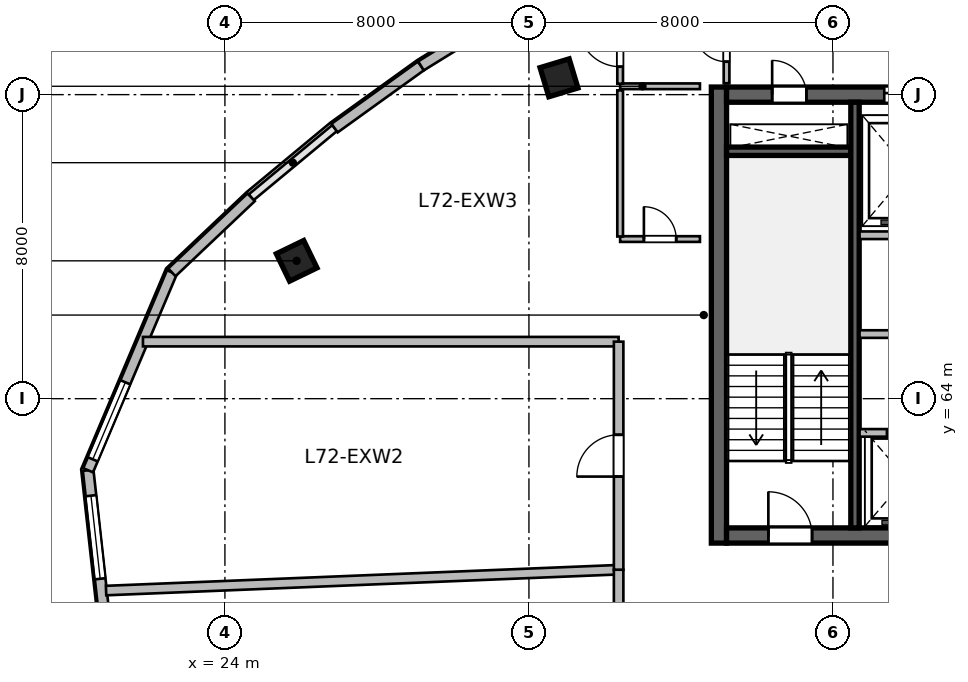
"""IFC4 building model, lengths in metres.
Left out: names, types, materials, properties, quantities, classifications, styles, units other than length and angle.
Written with IfcOpenShell. Run it as: python <this file> out.ifc"""

import sys

from ifc_helpers import new_model, si_unit, direction, frame, frame_2d, origin, origin_2d, place, context, subcontext, project, spatial, rectangle, extrude, source, transform, mapped, element, fill, save


model = new_model("IFC4")
c1 = context("Model", 3, precision=1e-05, world=origin(), true_north=direction((0.0, 1.0)))
c2 = subcontext(c1, "Body", "Model", "MODEL_VIEW")
j1 = project(units=[si_unit("LENGTHUNIT", "METRE"), si_unit("PLANEANGLEUNIT", "RADIAN")], contexts=[c1])
p1 = place(None, origin())
s1 = spatial("IfcSite", under=j1, at=p1, CompositionType="ELEMENT")
p2 = place(p1, origin())
s2 = spatial("IfcBuilding", under=s1, at=p2, CompositionType="ELEMENT")
p3 = place(p2, frame((0.0, 0.0, 295.2)))
s3 = spatial("IfcBuildingStorey", under=s2, at=p3, CompositionType="ELEMENT", Elevation=295.2)
m1 = source(origin(), c2, "Body", "SweptSolid", [
    extrude(rectangle(XDim=12.0, YDim=0.4, at=frame_2d((6.0, 0.0))), origin(), (0.0, 0.0, 1.0), 3.9),
])
p4 = place(p3, frame((37.0, 60.2, 0.0), z_axis=(0.0, 0.0, 1.0), x_axis=(0.0, 1.0, 0.0)))
e1 = element("IfcWall", 1, at=p4, inside=s3, PredefinedType="SHEAR", context=c2, shape_type="MappedRepresentation", body=[
    mapped(m1, transform((0.0, 0.0, 0.0), scale=1.0)),
])
m2 = source(origin(), c2, "Body", "SweptSolid", [
    extrude(rectangle(XDim=21.6, YDim=0.4, at=frame_2d((10.8, 0.0))), origin(), (0.0, 0.0, 1.0), 3.9),
])
p5 = place(p3, frame((37.2, 60.4, 0.0), z_axis=(0.0, 0.0, 1.0), x_axis=(1.0, 0.0, 0.0)))
e2 = element("IfcWall", 2, at=p5, inside=s3, PredefinedType="SHEAR", context=c2, shape_type="MappedRepresentation", body=[
    mapped(m2, transform((0.0, 0.0, 0.0), scale=1.0)),
])
p6 = place(p5, frame((1.1, 0.0, 0.0)))
e3 = element("IfcOpeningElement", 3, at=p6, cuts=e2, PredefinedType="OPENING", context=c2, shape_type="SweptSolid", body=[
    extrude(rectangle(XDim=1.15, YDim=2.15, at=frame_2d((0.575, 1.075))), frame((0.0, 0.21, 0.0), z_axis=(0.0, -1.0, 0.0), x_axis=(1.0, 0.0, 0.0)), (0.0, 0.0, 1.0), 0.42),
])
p7 = place(p5, frame((19.5, 0.0, 0.0)))
e4 = element("IfcOpeningElement", 4, at=p7, cuts=e2, PredefinedType="OPENING", context=c2, shape_type="SweptSolid", body=[
    extrude(rectangle(XDim=0.9, YDim=2.1, at=frame_2d((0.45, 1.05))), frame((0.0, 0.21, 0.0), z_axis=(0.0, -1.0, 0.0), x_axis=(1.0, 0.0, 0.0)), (0.0, 0.0, 1.0), 0.42),
])
p8 = place(p5, frame((12.02, 0.0, 0.0)))
e5 = element("IfcOpeningElement", 5, at=p8, cuts=e2, PredefinedType="OPENING", context=c2, shape_type="SweptSolid", body=[
    extrude(rectangle(XDim=1.6, YDim=2.15, at=frame_2d((0.8, 1.075))), frame((0.0, 0.21, 0.0), z_axis=(0.0, -1.0, 0.0), x_axis=(1.0, 0.0, 0.0)), (0.0, 0.0, 1.0), 0.42),
])
p9 = place(p3, frame((37.2, 72.0, 0.0), z_axis=(0.0, 0.0, 1.0), x_axis=(1.0, 0.0, 0.0)))
e6 = element("IfcWall", 6, at=p9, inside=s3, PredefinedType="SHEAR", context=c2, shape_type="MappedRepresentation", body=[
    mapped(m2, transform((0.0, 0.0, 0.0), scale=1.0)),
])
p10 = place(p9, frame((1.2, 0.0, 0.0)))
e7 = element("IfcOpeningElement", 7, at=p10, cuts=e6, PredefinedType="OPENING", context=c2, shape_type="SweptSolid", body=[
    extrude(rectangle(XDim=0.9, YDim=2.1, at=frame_2d((0.45, 1.05))), frame((0.0, 0.21, 0.0), z_axis=(0.0, -1.0, 0.0), x_axis=(1.0, 0.0, 0.0)), (0.0, 0.0, 1.0), 0.42),
])
p11 = place(p9, frame((14.7, 0.0, 0.0)))
e8 = element("IfcOpeningElement", 8, at=p11, cuts=e6, PredefinedType="OPENING", context=c2, shape_type="SweptSolid", body=[
    extrude(rectangle(XDim=1.2, YDim=2.15, at=frame_2d((0.6, 1.075))), frame((0.0, 0.21, 0.0), z_axis=(0.0, -1.0, 0.0), x_axis=(1.0, 0.0, 0.0)), (0.0, 0.0, 1.0), 0.42),
])
p12 = place(p9, frame((4.15, 0.0, 0.0)))
e9 = element("IfcOpeningElement", 9, at=p12, cuts=e6, PredefinedType="OPENING", context=c2, shape_type="SweptSolid", body=[
    extrude(rectangle(XDim=1.3, YDim=2.15, at=frame_2d((0.65, 1.075))), frame((0.0, 0.21, 0.0), z_axis=(0.0, -1.0, 0.0), x_axis=(1.0, 0.0, 0.0)), (0.0, 0.0, 1.0), 0.42),
])
p13 = place(p9, frame((7.25, 0.0, 0.0)))
e10 = element("IfcOpeningElement", 10, at=p13, cuts=e6, PredefinedType="OPENING", context=c2, shape_type="SweptSolid", body=[
    extrude(rectangle(XDim=0.9, YDim=2.1, at=frame_2d((0.45, 1.05))), frame((0.0, 0.21, 0.0), z_axis=(0.0, -1.0, 0.0), x_axis=(1.0, 0.0, 0.0)), (0.0, 0.0, 1.0), 0.42),
])
p14 = place(p9, frame((10.95, 0.0, 0.0)))
e11 = element("IfcOpeningElement", 11, at=p14, cuts=e6, PredefinedType="OPENING", context=c2, shape_type="SweptSolid", body=[
    extrude(rectangle(XDim=0.9, YDim=2.1, at=frame_2d((0.45, 1.05))), frame((0.0, 0.21, 0.0), z_axis=(0.0, -1.0, 0.0), x_axis=(1.0, 0.0, 0.0)), (0.0, 0.0, 1.0), 0.42),
])
m3 = source(origin(), c2, "Body", "SweptSolid", [
    extrude(rectangle(XDim=3.27, YDim=0.22, at=frame_2d((1.635, 0.0))), origin(), (0.0, 0.0, 1.0), 3.9),
])
p15 = place(p3, frame((37.2, 70.51, 0.0), z_axis=(0.0, 0.0, 1.0), x_axis=(1.0, 0.0, 0.0)))
e12 = element("IfcWall", 12, at=p15, inside=s3, PredefinedType="SHEAR", context=c2, shape_type="MappedRepresentation", body=[
    mapped(m3, transform((0.0, 0.0, 0.0), scale=1.0)),
])
m4 = source(origin(), c2, "Body", "SweptSolid", [
    extrude(rectangle(XDim=11.2, YDim=0.22, at=frame_2d((5.6, 0.0))), origin(), (0.0, 0.0, 1.0), 3.9),
])
p16 = place(p3, frame((40.58, 60.6, 0.0), z_axis=(0.0, 0.0, 1.0), x_axis=(0.0, 1.0, 0.0)))
e13 = element("IfcWall", 13, at=p16, inside=s3, PredefinedType="SHEAR", context=c2, shape_type="MappedRepresentation", body=[
    mapped(m4, transform((0.0, 0.0, 0.0), scale=1.0)),
])
m5 = source(origin(), c2, "Body", "SweptSolid", [
    extrude(rectangle(XDim=0.8, YDim=0.8, at=origin_2d()), origin(), (0.0, 0.0, 1.0), 3.9),
])
for number, where, z_axis, x_axis in (
    (14, (25.888, 67.627, 0.0), (0.0, 0.0, 1.0), (-0.436, 0.9, 0.0)),
    (15, (32.791, 72.442, 0.0), (0.0, 0.0, 1.0), (-0.289, 0.957, 0.0)),
):
    element("IfcColumn", number, at=place(p3, frame(where, z_axis=z_axis, x_axis=x_axis)), inside=s3, PredefinedType="COLUMN", context=c2, shape_type="MappedRepresentation", body=[
        mapped(m5, transform((0.0, 0.0, 0.0), scale=1.0)),
    ])
m6 = source(origin(), c2, "Body", "SweptSolid", [
    extrude(rectangle(XDim=7.09, YDim=0.28, at=frame_2d((3.545, 0.0))), origin(), (0.0, 0.0, 1.0), 3.64),
])
p17 = place(p3, frame((21.182, 55.069, 0.0), z_axis=(0.0, 0.0, 1.0), x_axis=(-0.110159396922, 0.993913933532, 0.0)))
e16 = element("IfcWall", 16, at=p17, inside=s3, PredefinedType="SOLIDWALL", context=c2, shape_type="MappedRepresentation", body=[
    mapped(m6, transform((0.0, 0.0, 0.0), scale=1.0)),
])
p18 = place(p17, frame((4.217, 0.0, 0.95)))
e17 = element("IfcOpeningElement", 17, at=p18, cuts=e16, PredefinedType="OPENING", context=c2, shape_type="SweptSolid", body=[
    extrude(rectangle(XDim=2.2, YDim=2.1, at=frame_2d((1.1, 1.05))), frame((0.0, 0.15, 0.0), z_axis=(0.0, -1.0, 0.0), x_axis=(1.0, 0.0, 0.0)), (0.0, 0.0, 1.0), 0.3),
])
m7 = source(origin(), c2, "Body", "SweptSolid", [
    extrude(rectangle(XDim=5.655, YDim=0.28, at=frame_2d((2.828, 0.0))), origin(), (0.0, 0.0, 1.0), 3.64),
])
p19 = place(p3, frame((20.401, 62.116, 0.0), z_axis=(0.0, 0.0, 1.0), x_axis=(0.389585063528, 0.920990487614, 0.0)))
e18 = element("IfcWall", 18, at=p19, inside=s3, PredefinedType="SOLIDWALL", context=c2, shape_type="MappedRepresentation", body=[
    mapped(m7, transform((0.0, 0.0, 0.0), scale=1.0)),
])
p20 = place(p19, frame((0.314, 0.0, 0.95)))
e19 = element("IfcOpeningElement", 19, at=p20, cuts=e18, PredefinedType="OPENING", context=c2, shape_type="SweptSolid", body=[
    extrude(rectangle(XDim=2.2, YDim=2.1, at=frame_2d((1.1, 1.05))), frame((0.0, 0.15, 0.0), z_axis=(0.0, -1.0, 0.0), x_axis=(1.0, 0.0, 0.0)), (0.0, 0.0, 1.0), 0.3),
])
m8 = source(origin(), c2, "Body", "SweptSolid", [
    extrude(rectangle(XDim=2.873, YDim=0.28, at=frame_2d((1.436, 0.0))), origin(), (0.0, 0.0, 1.0), 3.64),
])
p21 = place(p3, frame((22.604, 67.324, 0.0), z_axis=(0.0, 0.0, 1.0), x_axis=(0.72609560544, 0.687593754888, 0.0)))
e20 = element("IfcWall", 20, at=p21, inside=s3, PredefinedType="SOLIDWALL", context=c2, shape_type="MappedRepresentation", body=[
    mapped(m8, transform((0.0, 0.0, 0.0), scale=1.0)),
])
m9 = source(origin(), c2, "Body", "SweptSolid", [
    extrude(rectangle(XDim=2.802, YDim=0.28, at=frame_2d((1.401, 0.0))), origin(), (0.0, 0.0, 1.0), 3.64),
])
p22 = place(p3, frame((26.885, 71.12, 0.0), z_axis=(0.0, 0.0, 1.0), x_axis=(0.811507896482, 0.584341453217, 0.0)))
e21 = element("IfcWall", 21, at=p22, inside=s3, PredefinedType="SOLIDWALL", context=c2, shape_type="MappedRepresentation", body=[
    mapped(m9, transform((0.0, 0.0, 0.0), scale=1.0)),
])
m10 = source(origin(), c2, "Body", "SweptSolid", [
    extrude(rectangle(XDim=2.755, YDim=0.28, at=frame_2d((1.377, 0.0))), origin(), (0.0, 0.0, 1.0), 3.64),
])
p23 = place(p3, frame((29.159, 72.757, 0.0), z_axis=(0.0, 0.0, 1.0), x_axis=(0.850750210743, 0.525570241661, 0.0)))
e22 = element("IfcWall", 22, at=p23, inside=s3, PredefinedType="SOLIDWALL", context=c2, shape_type="MappedRepresentation", body=[
    mapped(m10, transform((0.0, 0.0, 0.0), scale=1.0)),
])
m11 = source(origin(), c2, "Body", "SweptSolid", [
    extrude(rectangle(XDim=8.8, YDim=0.2, at=frame_2d((4.4, 0.0))), origin(), (0.0, 0.0, 1.0), 3.64),
])
p24 = place(p3, frame((40.7, 68.3, 0.0), z_axis=(0.0, 0.0, 1.0), x_axis=(1.0, 0.0, 0.0)))
e23 = element("IfcWall", 23, at=p24, inside=s3, PredefinedType="SOLIDWALL", context=c2, shape_type="MappedRepresentation", body=[
    mapped(m11, transform((0.0, 0.0, 0.0), scale=1.0)),
])
m12 = source(origin(), c2, "Body", "SweptSolid", [
    extrude(rectangle(XDim=8.02, YDim=0.2, at=frame_2d((4.01, 0.0))), origin(), (0.0, 0.0, 1.0), 3.64),
])
p25 = place(p3, frame((40.7, 63.1, 0.0), z_axis=(0.0, 0.0, 1.0), x_axis=(1.0, 0.0, 0.0)))
e24 = element("IfcWall", 24, at=p25, inside=s3, PredefinedType="SOLIDWALL", context=c2, shape_type="MappedRepresentation", body=[
    mapped(m12, transform((0.0, 0.0, 0.0), scale=1.0)),
])
p26 = place(p25, frame((0.72, 0.0, 0.0)))
e25 = element("IfcOpeningElement", 25, at=p26, cuts=e24, PredefinedType="OPENING", context=c2, shape_type="SweptSolid", body=[
    extrude(rectangle(XDim=1.0, YDim=2.15, at=frame_2d((0.5, 1.075))), frame((0.0, 0.11, 0.0), z_axis=(0.0, -1.0, 0.0), x_axis=(1.0, 0.0, 0.0)), (0.0, 0.0, 1.0), 0.22),
])
p27 = place(p25, frame((2.62, 0.0, 0.0)))
e26 = element("IfcOpeningElement", 26, at=p27, cuts=e24, PredefinedType="OPENING", context=c2, shape_type="SweptSolid", body=[
    extrude(rectangle(XDim=1.0, YDim=2.15, at=frame_2d((0.5, 1.075))), frame((0.0, 0.11, 0.0), z_axis=(0.0, -1.0, 0.0), x_axis=(1.0, 0.0, 0.0)), (0.0, 0.0, 1.0), 0.22),
])
p28 = place(p25, frame((4.55, 0.0, 0.0)))
e27 = element("IfcOpeningElement", 27, at=p28, cuts=e24, PredefinedType="OPENING", context=c2, shape_type="SweptSolid", body=[
    extrude(rectangle(XDim=1.0, YDim=2.15, at=frame_2d((0.5, 1.075))), frame((0.0, 0.11, 0.0), z_axis=(0.0, -1.0, 0.0), x_axis=(1.0, 0.0, 0.0)), (0.0, 0.0, 1.0), 0.22),
])
p29 = place(p25, frame((6.55, 0.0, 0.0)))
e28 = element("IfcOpeningElement", 28, at=p29, cuts=e24, PredefinedType="OPENING", context=c2, shape_type="SweptSolid", body=[
    extrude(rectangle(XDim=1.0, YDim=2.15, at=frame_2d((0.5, 1.075))), frame((0.0, 0.11, 0.0), z_axis=(0.0, -1.0, 0.0), x_axis=(1.0, 0.0, 0.0)), (0.0, 0.0, 1.0), 0.22),
])
p30 = place(p3, frame((40.7, 65.7, 0.0), z_axis=(0.0, 0.0, 1.0), x_axis=(1.0, 0.0, 0.0)))
e29 = element("IfcWall", 29, at=p30, inside=s3, PredefinedType="SOLIDWALL", context=c2, shape_type="MappedRepresentation", body=[
    mapped(m11, transform((0.0, 0.0, 0.0), scale=1.0)),
])
p31 = place(p30, frame((1.6, 0.0, 0.0)))
e30 = element("IfcOpeningElement", 30, at=p31, cuts=e29, PredefinedType="OPENING", context=c2, shape_type="SweptSolid", body=[
    extrude(rectangle(XDim=0.9, YDim=2.1, at=frame_2d((0.45, 1.05))), frame((0.0, 0.11, 0.0), z_axis=(0.0, -1.0, 0.0), x_axis=(1.0, 0.0, 0.0)), (0.0, 0.0, 1.0), 0.22),
])
p32 = place(p30, frame((6.1, 0.0, 0.0)))
e31 = element("IfcOpeningElement", 31, at=p32, cuts=e29, PredefinedType="OPENING", context=c2, shape_type="SweptSolid", body=[
    extrude(rectangle(XDim=0.9, YDim=2.1, at=frame_2d((0.45, 1.05))), frame((0.0, 0.11, 0.0), z_axis=(0.0, -1.0, 0.0), x_axis=(1.0, 0.0, 0.0)), (0.0, 0.0, 1.0), 0.22),
])
m13 = source(origin(), c2, "Body", "SweptSolid", [
    extrude(rectangle(XDim=2.1, YDim=0.15, at=frame_2d((1.05, 0.0))), origin(), (0.0, 0.0, 1.0), 3.64),
])
p33 = place(p3, frame((34.4, 72.22, 0.0), z_axis=(0.0, 0.0, 1.0), x_axis=(1.0, 0.0, 0.0)))
e32 = element("IfcWall", 32, at=p33, inside=s3, PredefinedType="PARTITIONING", context=c2, shape_type="MappedRepresentation", body=[
    mapped(m13, transform((0.0, 0.0, 0.0), scale=1.0)),
])
m14 = source(origin(), c2, "Body", "SweptSolid", [
    extrude(rectangle(XDim=1.995, YDim=0.15, at=frame_2d((0.998, 0.0))), origin(), (0.0, 0.0, 1.0), 3.64),
])
p34 = place(p3, frame((34.4, 72.288, 0.0), z_axis=(0.0, 0.0, 1.0), x_axis=(0.0, 1.0, 0.0)))
e33 = element("IfcWall", 33, at=p34, inside=s3, PredefinedType="PARTITIONING", context=c2, shape_type="MappedRepresentation", body=[
    mapped(m14, transform((0.0, 0.0, 0.0), scale=1.0)),
])
p35 = place(p34, frame((0.448, 0.0, 0.0)))
e34 = element("IfcOpeningElement", 34, at=p35, cuts=e33, PredefinedType="OPENING", context=c2, shape_type="SweptSolid", body=[
    extrude(rectangle(XDim=1.1, YDim=2.15, at=frame_2d((0.55, 1.075))), frame((0.0, 0.085, 0.0), z_axis=(0.0, -1.0, 0.0), x_axis=(1.0, 0.0, 0.0)), (0.0, 0.0, 1.0), 0.17),
])
m15 = source(origin(), c2, "Body", "SweptSolid", [
    extrude(rectangle(XDim=1.982, YDim=0.15, at=frame_2d((0.991, 0.0))), origin(), (0.0, 0.0, 1.0), 3.64),
])
p36 = place(p3, frame((37.2, 72.3, 0.0), z_axis=(0.0, 0.0, 1.0), x_axis=(0.0, 1.0, 0.0)))
e35 = element("IfcWall", 35, at=p36, inside=s3, PredefinedType="PARTITIONING", context=c2, shape_type="MappedRepresentation", body=[
    mapped(m15, transform((0.0, 0.0, 0.0), scale=1.0)),
])
p37 = place(p36, frame((0.566, 0.0, 0.0)))
e36 = element("IfcOpeningElement", 36, at=p37, cuts=e35, PredefinedType="OPENING", context=c2, shape_type="SweptSolid", body=[
    extrude(rectangle(XDim=0.85, YDim=2.1, at=frame_2d((0.425, 1.05))), frame((0.0, 0.085, 0.0), z_axis=(0.0, -1.0, 0.0), x_axis=(1.0, 0.0, 0.0)), (0.0, 0.0, 1.0), 0.17),
])
p38 = place(p3, frame((34.4, 68.2, 0.0), z_axis=(0.0, 0.0, 1.0), x_axis=(1.0, 0.0, 0.0)))
e37 = element("IfcWall", 37, at=p38, inside=s3, PredefinedType="PARTITIONING", context=c2, shape_type="MappedRepresentation", body=[
    mapped(m13, transform((0.0, 0.0, 0.0), scale=1.0)),
])
p39 = place(p38, frame((0.625, 0.0, 0.0)))
e38 = element("IfcOpeningElement", 38, at=p39, cuts=e37, PredefinedType="OPENING", context=c2, shape_type="SweptSolid", body=[
    extrude(rectangle(XDim=0.85, YDim=2.1, at=frame_2d((0.425, 1.05))), frame((0.0, 0.085, 0.0), z_axis=(0.0, -1.0, 0.0), x_axis=(1.0, 0.0, 0.0)), (0.0, 0.0, 1.0), 0.17),
])
m16 = source(origin(), c2, "Body", "SweptSolid", [
    extrude(rectangle(XDim=3.845, YDim=0.15, at=frame_2d((1.922, 0.0))), origin(), (0.0, 0.0, 1.0), 3.64),
])
p40 = place(p3, frame((34.4, 68.268, 0.0), z_axis=(0.0, 0.0, 1.0), x_axis=(0.0, 1.0, 0.0)))
e39 = element("IfcWall", 39, at=p40, inside=s3, PredefinedType="PARTITIONING", context=c2, shape_type="MappedRepresentation", body=[
    mapped(m16, transform((0.0, 0.0, 0.0), scale=1.0)),
])
m17 = source(origin(), c2, "Body", "SweptSolid", [
    extrude(rectangle(XDim=13.499, YDim=0.25, at=frame_2d((6.75, 0.0))), origin(), (0.0, 0.0, 1.0), 3.64),
])
p41 = place(p3, frame((20.872, 58.951, 0.0), z_axis=(0.0, 0.0, 1.0), x_axis=(0.999172424054, 0.04067513995, 0.0)))
e40 = element("IfcWall", 40, at=p41, inside=s3, PredefinedType="PARTITIONING", context=c2, shape_type="MappedRepresentation", body=[
    mapped(m17, transform((0.0, 0.0, 0.0), scale=1.0)),
])
m18 = source(origin(), c2, "Body", "SweptSolid", [
    extrude(rectangle(XDim=1.54, YDim=0.25, at=frame_2d((0.77, 0.0))), origin(), (0.0, 0.0, 1.0), 3.64),
])
p42 = place(p3, frame((34.36, 57.96, 0.0), z_axis=(0.0, 0.0, 1.0), x_axis=(0.0, 1.0, 0.0)))
e41 = element("IfcWall", 41, at=p42, inside=s3, PredefinedType="PARTITIONING", context=c2, shape_type="MappedRepresentation", body=[
    mapped(m18, transform((0.0, 0.0, 0.0), scale=1.0)),
])
m19 = source(origin(), c2, "Body", "SweptSolid", [
    extrude(rectangle(XDim=12.517, YDim=0.25, at=frame_2d((6.258, 0.0))), origin(), (0.0, 0.0, 1.0), 3.64),
])
p43 = place(p3, frame((21.844, 65.5, 0.0), z_axis=(0.0, 0.0, 1.0), x_axis=(1.0, 0.0, 0.0)))
e42 = element("IfcWall", 42, at=p43, inside=s3, PredefinedType="PARTITIONING", context=c2, shape_type="MappedRepresentation", body=[
    mapped(m19, transform((0.0, 0.0, 0.0), scale=1.0)),
])
m20 = source(origin(), c2, "Body", "SweptSolid", [
    extrude(rectangle(XDim=6.0, YDim=0.25, at=frame_2d((3.0, 0.0))), origin(), (0.0, 0.0, 1.0), 3.64),
])
p44 = place(p3, frame((34.36, 59.5, 0.0), z_axis=(0.0, 0.0, 1.0), x_axis=(0.0, 1.0, 0.0)))
e43 = element("IfcWall", 43, at=p44, inside=s3, PredefinedType="PARTITIONING", context=c2, shape_type="MappedRepresentation", body=[
    mapped(m20, transform((0.0, 0.0, 0.0), scale=1.0)),
])
p45 = place(p44, frame((2.45, 0.0, 0.0)))
e44 = element("IfcOpeningElement", 44, at=p45, cuts=e43, PredefinedType="OPENING", context=c2, shape_type="SweptSolid", body=[
    extrude(rectangle(XDim=1.1, YDim=2.15, at=frame_2d((0.55, 1.075))), frame((0.0, 0.135, 0.0), z_axis=(0.0, -1.0, 0.0), x_axis=(1.0, 0.0, 0.0)), (0.0, 0.0, 1.0), 0.27),
])
m21 = source(origin(), c2, "Body", "SweptSolid", [
    extrude(rectangle(XDim=2.2, YDim=2.1, at=frame_2d((1.1, 1.05))), frame((0.0, 0.03, 0.0), z_axis=(0.0, -1.0, 0.0), x_axis=(1.0, 0.0, 0.0)), (0.0, 0.0, 1.0), 0.06),
])
p46 = place(p18, origin())
e45 = element("IfcWindow", 45, at=p46, inside=s3, PartitioningType="TRIPLE_PANEL_VERTICAL", PredefinedType="WINDOW", context=c2, shape_type="MappedRepresentation", body=[
    mapped(m21, transform((0.0, 0.0, 0.0), scale=1.0)),
])
fill(e17, e45)
p47 = place(p20, origin())
e46 = element("IfcWindow", 46, at=p47, inside=s3, PartitioningType="TRIPLE_PANEL_VERTICAL", PredefinedType="WINDOW", context=c2, shape_type="MappedRepresentation", body=[
    mapped(m21, transform((0.0, 0.0, 0.0), scale=1.0)),
])
fill(e19, e46)
m22 = source(origin(), c2, "Body", "SweptSolid", [
    extrude(rectangle(XDim=1.15, YDim=2.15, at=frame_2d((0.575, 1.075))), frame((0.0, 0.025, 0.0), z_axis=(0.0, -1.0, 0.0), x_axis=(1.0, 0.0, 0.0)), (0.0, 0.0, 1.0), 0.05),
])
p48 = place(p6, origin())
e47 = element("IfcDoor", 47, at=p48, inside=s3, OperationType="SINGLE_SWING_LEFT", PredefinedType="DOOR", context=c2, shape_type="MappedRepresentation", body=[
    mapped(m22, transform((0.0, 0.0, 0.0), scale=1.0)),
])
fill(e3, e47)
m23 = source(origin(), c2, "Body", "SweptSolid", [
    extrude(rectangle(XDim=0.9, YDim=2.1, at=frame_2d((0.45, 1.05))), frame((0.0, 0.025, 0.0), z_axis=(0.0, -1.0, 0.0), x_axis=(1.0, 0.0, 0.0)), (0.0, 0.0, 1.0), 0.05),
])
p49 = place(p10, origin())
e48 = element("IfcDoor", 48, at=p49, inside=s3, OperationType="SINGLE_SWING_LEFT", PredefinedType="DOOR", context=c2, shape_type="MappedRepresentation", body=[
    mapped(m23, transform((0.0, 0.0, 0.0), scale=1.0)),
])
fill(e7, e48)
m24 = source(origin(), c2, "Body", "SweptSolid", [
    extrude(rectangle(XDim=1.3, YDim=2.15, at=frame_2d((0.65, 1.075))), frame((0.0, 0.025, 0.0), z_axis=(0.0, -1.0, 0.0), x_axis=(1.0, 0.0, 0.0)), (0.0, 0.0, 1.0), 0.05),
])
p50 = place(p12, origin())
e49 = element("IfcDoor", 49, at=p50, inside=s3, OperationType="DOUBLE_DOOR_SLIDING", PredefinedType="DOOR", context=c2, shape_type="MappedRepresentation", body=[
    mapped(m24, transform((0.0, 0.0, 0.0), scale=1.0)),
])
fill(e9, e49)
m25 = source(origin(), c2, "Body", "SweptSolid", [
    extrude(rectangle(XDim=1.0, YDim=2.15, at=frame_2d((0.5, 1.075))), frame((0.0, 0.025, 0.0), z_axis=(0.0, -1.0, 0.0), x_axis=(1.0, 0.0, 0.0)), (0.0, 0.0, 1.0), 0.05),
])
p51 = place(p26, origin())
e50 = element("IfcDoor", 50, at=p51, inside=s3, OperationType="DOUBLE_DOOR_SLIDING", PredefinedType="DOOR", context=c2, shape_type="MappedRepresentation", body=[
    mapped(m25, transform((0.0, 0.0, 0.0), scale=1.0)),
])
fill(e25, e50)
m26 = source(origin(), c2, "Body", "SweptSolid", [
    extrude(rectangle(XDim=0.85, YDim=2.1, at=frame_2d((0.425, 1.05))), frame((0.0, 0.025, 0.0), z_axis=(0.0, -1.0, 0.0), x_axis=(1.0, 0.0, 0.0)), (0.0, 0.0, 1.0), 0.05),
])
p52 = place(p37, origin())
e51 = element("IfcDoor", 51, at=p52, inside=s3, OperationType="SINGLE_SWING_RIGHT", PredefinedType="DOOR", context=c2, shape_type="MappedRepresentation", body=[
    mapped(m26, transform((0.0, 0.0, 0.0), scale=1.0)),
])
fill(e36, e51)
p53 = place(p39, origin())
e52 = element("IfcDoor", 52, at=p53, inside=s3, OperationType="SINGLE_SWING_LEFT", PredefinedType="DOOR", context=c2, shape_type="MappedRepresentation", body=[
    mapped(m26, transform((0.0, 0.0, 0.0), scale=1.0)),
])
fill(e38, e52)
m27 = source(origin(), c2, "Body", "SweptSolid", [
    extrude(rectangle(XDim=1.1, YDim=2.15, at=frame_2d((0.55, 1.075))), frame((0.0, 0.025, 0.0), z_axis=(0.0, -1.0, 0.0), x_axis=(1.0, 0.0, 0.0)), (0.0, 0.0, 1.0), 0.05),
])
p54 = place(p45, origin())
e53 = element("IfcDoor", 53, at=p54, inside=s3, OperationType="SINGLE_SWING_LEFT", PredefinedType="DOOR", context=c2, shape_type="MappedRepresentation", body=[
    mapped(m27, transform((0.0, 0.0, 0.0), scale=1.0)),
])
fill(e44, e53)
p55 = place(p35, origin())
e54 = element("IfcDoor", 54, at=p55, inside=s3, OperationType="SINGLE_SWING_RIGHT", PredefinedType="DOOR", context=c2, shape_type="MappedRepresentation", body=[
    mapped(m27, transform((0.0, 0.0, 0.0), scale=1.0)),
])
fill(e34, e54)
save(model, sys.argv[1])
